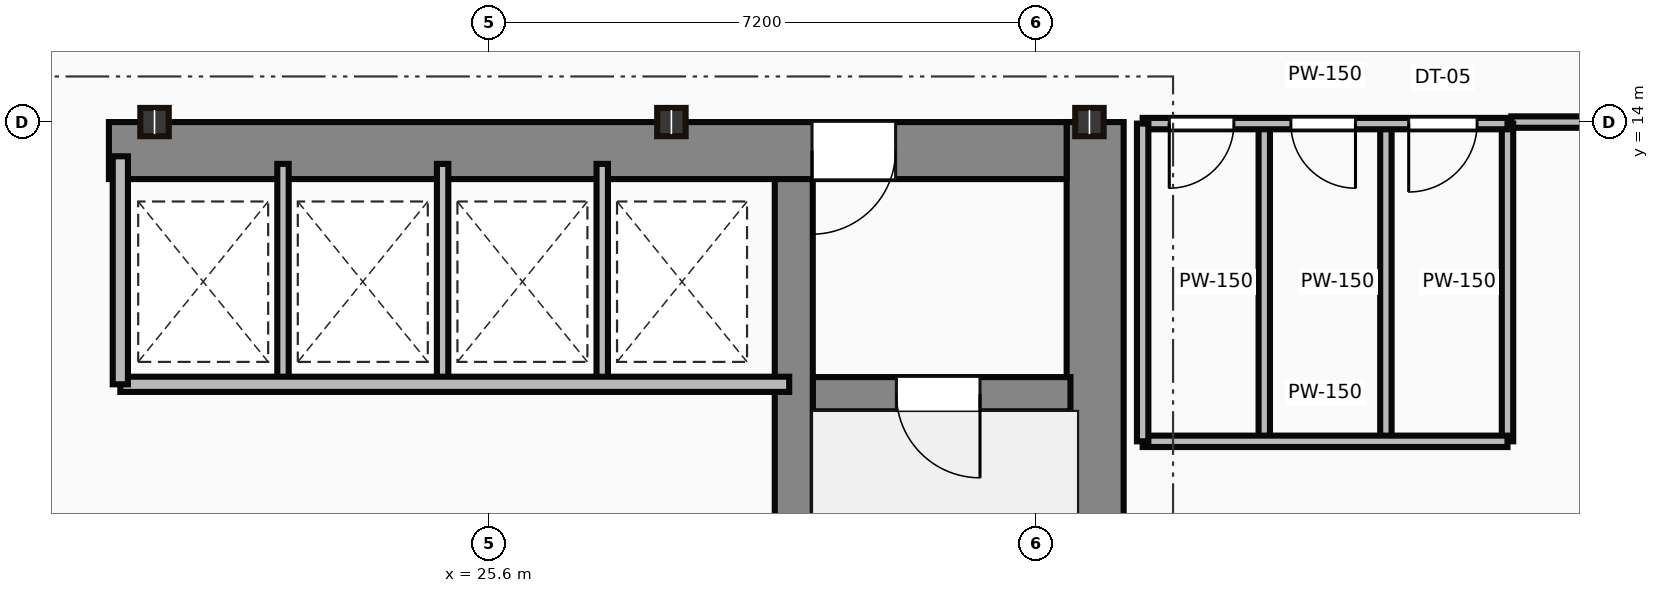
"""IFC4 building model, lengths in metres.
Left out: names, types, materials, properties, quantities, classifications, styles, units other than length and angle.
Written with IfcOpenShell. Run it as: python <this file> out.ifc"""

import sys

from ifc_helpers import new_model, si_unit, direction, frame, frame_2d, origin, origin_2d, place, context, subcontext, project, spatial, rectangle, i_section, extrude, source, transform, mapped, element, fill, save


model = new_model("IFC4")
c1 = context("Model", 3, precision=1e-05, world=origin(), true_north=direction((0.0, 1.0)))
c2 = subcontext(c1, "Body", "Model", "MODEL_VIEW")
j1 = project(units=[si_unit("LENGTHUNIT", "METRE"), si_unit("PLANEANGLEUNIT", "RADIAN")], contexts=[c1])
p1 = place(None, origin())
s1 = spatial("IfcSite", under=j1, at=p1, CompositionType="ELEMENT")
p2 = place(p1, origin())
s2 = spatial("IfcBuilding", under=s1, at=p2, CompositionType="ELEMENT")
p3 = place(p2, frame((0.0, 0.0, 162.5)))
s3 = spatial("IfcBuildingStorey", under=s2, at=p3, CompositionType="ELEMENT", Elevation=162.5)
m1 = source(origin(), c2, "Body", "SweptSolid", [
    extrude(rectangle(XDim=13.1, YDim=0.75, at=frame_2d((6.55, 0.0))), origin(), (0.0, 0.0, 1.0), 3.65),
])
p4 = place(p3, frame((33.575, 0.9, 0.0), z_axis=(0.0, 0.0, 1.0), x_axis=(0.0, 1.0, 0.0)))
e1 = element("IfcWall", 1, at=p4, inside=s3, PredefinedType="SHEAR", context=c2, shape_type="MappedRepresentation", body=[
    mapped(m1, transform((0.0, 0.0, 0.0))),
])
m2 = source(origin(), c2, "Body", "SweptSolid", [
    extrude(rectangle(XDim=12.6, YDim=0.75, at=frame_2d((6.3, 0.0))), origin(), (0.0, 0.0, 1.0), 3.65),
])
p5 = place(p3, frame((20.6, 13.625, 0.0), z_axis=(0.0, 0.0, 1.0), x_axis=(1.0, 0.0, 0.0)))
e2 = element("IfcWall", 2, at=p5, inside=s3, PredefinedType="SHEAR", context=c2, shape_type="MappedRepresentation", body=[
    mapped(m2, transform((0.0, 0.0, 0.0))),
])
p6 = place(p5, frame((9.25, 0.0, 0.0)))
e3 = element("IfcOpeningElement", 3, at=p6, cuts=e2, PredefinedType="OPENING", context=c2, shape_type="SweptSolid", body=[
    extrude(rectangle(XDim=1.1, YDim=2.15, at=frame_2d((0.55, 1.075))), frame((0.0, 0.385, 0.0), z_axis=(0.0, -1.0, 0.0), x_axis=(1.0, 0.0, 0.0)), (0.0, 0.0, 1.0), 0.77),
])
m3 = source(origin(), c2, "Body", "SweptSolid", [
    extrude(rectangle(XDim=12.35, YDim=0.5, at=frame_2d((6.175, 0.0))), origin(), (0.0, 0.0, 1.0), 3.65),
])
p7 = place(p3, frame((29.61, 0.9, 0.0), z_axis=(0.0, 0.0, 1.0), x_axis=(0.0, 1.0, 0.0)))
e4 = element("IfcWall", 4, at=p7, inside=s3, PredefinedType="SHEAR", context=c2, shape_type="MappedRepresentation", body=[
    mapped(m3, transform((0.0, 0.0, 0.0))),
])
m4 = source(origin(), c2, "Body", "SweptSolid", [
    extrude(rectangle(XDim=3.39, YDim=0.45, at=frame_2d((1.695, 0.0))), origin(), (0.0, 0.0, 1.0), 3.65),
])
p8 = place(p3, frame((29.86, 10.42, 0.0), z_axis=(0.0, 0.0, 1.0), x_axis=(1.0, 0.0, 0.0)))
e5 = element("IfcWall", 5, at=p8, inside=s3, PredefinedType="SHEAR", context=c2, shape_type="MappedRepresentation", body=[
    mapped(m4, transform((0.0, 0.0, 0.0))),
])
p9 = place(p8, frame((1.1, 0.0, 0.0)))
e6 = element("IfcOpeningElement", 6, at=p9, cuts=e5, PredefinedType="OPENING", context=c2, shape_type="SweptSolid", body=[
    extrude(rectangle(XDim=1.1, YDim=2.15, at=frame_2d((0.55, 1.075))), frame((0.0, 0.235, 0.0), z_axis=(0.0, -1.0, 0.0), x_axis=(1.0, 0.0, 0.0)), (0.0, 0.0, 1.0), 0.47),
])
m5 = source(origin(), c2, "Body", "SweptSolid", [
    extrude(i_section(OverallWidth=0.374, OverallDepth=0.372, WebThickness=0.016, FlangeThickness=0.026, at=origin_2d()), origin(), (0.0, 0.0, 1.0), 3.65),
])
for number, where, z_axis, x_axis in (
    (7, (21.2, 14.0, 0.0), (0.0, 0.0, 1.0), (1.0, 0.0, 0.0)),
    (8, (28.0, 14.0, 0.0), (0.0, 0.0, 1.0), (1.0, 0.0, 0.0)),
    (9, (33.5, 14.0, 0.0), (0.0, 0.0, 1.0), (1.0, 0.0, 0.0)),
):
    element("IfcColumn", number, at=place(p3, frame(where, z_axis=z_axis, x_axis=x_axis)), inside=s3, PredefinedType="COLUMN", context=c2, shape_type="MappedRepresentation", body=[
        mapped(m5, transform((0.0, 0.0, 0.0))),
    ])
m6 = source(origin(), c2, "Body", "SweptSolid", [
    extrude(rectangle(XDim=8.8, YDim=0.2, at=frame_2d((4.4, 0.0))), origin(), (0.0, 0.0, 1.0), 3.4),
])
p10 = place(p3, frame((20.75, 10.55, 0.0), z_axis=(0.0, 0.0, 1.0), x_axis=(1.0, 0.0, 0.0)))
e10 = element("IfcWall", 10, at=p10, inside=s3, PredefinedType="PARTITIONING", context=c2, shape_type="MappedRepresentation", body=[
    mapped(m6, transform((0.0, 0.0, 0.0))),
])
m7 = source(origin(), c2, "Body", "SweptSolid", [
    extrude(rectangle(XDim=3.0, YDim=0.2, at=frame_2d((1.5, 0.0))), origin(), (0.0, 0.0, 1.0), 3.4),
])
p11 = place(p3, frame((20.75, 10.55, 0.0), z_axis=(0.0, 0.0, 1.0), x_axis=(0.0, 1.0, 0.0)))
e11 = element("IfcWall", 11, at=p11, inside=s3, PredefinedType="PARTITIONING", context=c2, shape_type="MappedRepresentation", body=[
    mapped(m7, transform((0.0, 0.0, 0.0))),
])
m8 = source(origin(), c2, "Body", "SweptSolid", [
    extrude(rectangle(XDim=2.85, YDim=0.15, at=frame_2d((1.425, 0.0))), origin(), (0.0, 0.0, 1.0), 3.4),
])
for number, where, z_axis, x_axis in (
    (12, (22.89, 10.6, 0.0), (0.0, 0.0, 1.0), (0.0, 1.0, 0.0)),
    (13, (24.99, 10.6, 0.0), (0.0, 0.0, 1.0), (0.0, 1.0, 0.0)),
    (14, (27.09, 10.6, 0.0), (0.0, 0.0, 1.0), (0.0, 1.0, 0.0)),
):
    element("IfcWall", number, at=place(p3, frame(where, z_axis=z_axis, x_axis=x_axis)), inside=s3, PredefinedType="PARTITIONING", context=c2, shape_type="MappedRepresentation", body=[
        mapped(m8, transform((0.0, 0.0, 0.0))),
    ])
m9 = source(origin(), c2, "Body", "SweptSolid", [
    extrude(rectangle(XDim=4.8, YDim=0.15, at=frame_2d((2.4, 0.0))), origin(), (0.0, 0.0, 1.0), 2.76),
])
p12 = place(p3, frame((34.2, 13.98, 0.0), z_axis=(0.0, 0.0, 1.0), x_axis=(1.0, 0.0, 0.0)))
e15 = element("IfcWall", 15, at=p12, inside=s3, PredefinedType="PARTITIONING", context=c2, shape_type="MappedRepresentation", body=[
    mapped(m9, transform((0.0, 0.0, 0.0))),
])
p13 = place(p12, frame((0.35, 0.0, 0.0)))
e16 = element("IfcOpeningElement", 16, at=p13, cuts=e15, PredefinedType="OPENING", context=c2, shape_type="SweptSolid", body=[
    extrude(rectangle(XDim=0.85, YDim=2.1, at=frame_2d((0.425, 1.05))), frame((0.0, 0.085, 0.0), z_axis=(0.0, -1.0, 0.0), x_axis=(1.0, 0.0, 0.0)), (0.0, 0.0, 1.0), 0.17),
])
p14 = place(p12, frame((1.95, 0.0, 0.0)))
e17 = element("IfcOpeningElement", 17, at=p14, cuts=e15, PredefinedType="OPENING", context=c2, shape_type="SweptSolid", body=[
    extrude(rectangle(XDim=0.85, YDim=2.1, at=frame_2d((0.425, 1.05))), frame((0.0, 0.085, 0.0), z_axis=(0.0, -1.0, 0.0), x_axis=(1.0, 0.0, 0.0)), (0.0, 0.0, 1.0), 0.17),
])
p15 = place(p12, frame((3.5, 0.0, 0.0)))
e18 = element("IfcOpeningElement", 18, at=p15, cuts=e15, PredefinedType="OPENING", context=c2, shape_type="SweptSolid", body=[
    extrude(rectangle(XDim=0.9, YDim=2.1, at=frame_2d((0.45, 1.05))), frame((0.0, 0.085, 0.0), z_axis=(0.0, -1.0, 0.0), x_axis=(1.0, 0.0, 0.0)), (0.0, 0.0, 1.0), 0.17),
])
m10 = source(origin(), c2, "Body", "SweptSolid", [
    extrude(rectangle(XDim=4.8, YDim=0.15, at=frame_2d((2.4, 0.0))), origin(), (0.0, 0.0, 1.0), 3.4),
])
p16 = place(p3, frame((34.2, 9.8, 0.0), z_axis=(0.0, 0.0, 1.0), x_axis=(1.0, 0.0, 0.0)))
e19 = element("IfcWall", 19, at=p16, inside=s3, PredefinedType="PARTITIONING", context=c2, shape_type="MappedRepresentation", body=[
    mapped(m10, transform((0.0, 0.0, 0.0))),
])
m11 = source(origin(), c2, "Body", "SweptSolid", [
    extrude(rectangle(XDim=4.18, YDim=0.15, at=frame_2d((2.09, 0.0))), origin(), (0.0, 0.0, 1.0), 3.4),
])
for number, where, z_axis, x_axis in (
    (20, (39.0, 9.8, 0.0), (0.0, 0.0, 1.0), (0.0, 1.0, 0.0)),
    (21, (34.2, 9.8, 0.0), (0.0, 0.0, 1.0), (0.0, 1.0, 0.0)),
    (22, (35.8, 9.8, 0.0), (0.0, 0.0, 1.0), (0.0, 1.0, 0.0)),
    (23, (37.4, 9.8, 0.0), (0.0, 0.0, 1.0), (0.0, 1.0, 0.0)),
):
    element("IfcWall", number, at=place(p3, frame(where, z_axis=z_axis, x_axis=x_axis)), inside=s3, PredefinedType="PARTITIONING", context=c2, shape_type="MappedRepresentation", body=[
        mapped(m11, transform((0.0, 0.0, 0.0))),
    ])
m12 = source(origin(), c2, "Body", "SweptSolid", [
    extrude(rectangle(XDim=1.75, YDim=0.15, at=frame_2d((0.875, 0.0))), origin(), (0.0, 0.0, 1.0), 2.76),
])
p17 = place(p3, frame((40.8, 14.0, 0.0), z_axis=(0.0, 0.0, 1.0), x_axis=(-1.0, 0.0, 0.0)))
e24 = element("IfcWall", 24, at=p17, inside=s3, PredefinedType="PARTITIONING", context=c2, shape_type="MappedRepresentation", body=[
    mapped(m12, transform((0.0, 0.0, 0.0))),
])
m13 = source(origin(), c2, "Body", "SweptSolid", [
    extrude(rectangle(XDim=1.1, YDim=2.15, at=frame_2d((0.55, 1.075))), frame((0.0, 0.025, 0.0), z_axis=(0.0, -1.0, 0.0), x_axis=(1.0, 0.0, 0.0)), (0.0, 0.0, 1.0), 0.05),
])
p18 = place(p9, frame((1.1, 0.0, 0.0), z_axis=(0.0, 0.0, 1.0), x_axis=(-1.0, 0.0, 0.0)))
e25 = element("IfcDoor", 25, at=p18, inside=s3, OperationType="SINGLE_SWING_RIGHT", PredefinedType="DOOR", context=c2, shape_type="MappedRepresentation", body=[
    mapped(m13, transform((0.0, 0.0, 0.0))),
])
fill(e6, e25)
p19 = place(p6, origin())
e26 = element("IfcDoor", 26, at=p19, inside=s3, OperationType="SINGLE_SWING_LEFT", PredefinedType="DOOR", context=c2, shape_type="MappedRepresentation", body=[
    mapped(m13, transform((0.0, 0.0, 0.0))),
])
fill(e3, e26)
m14 = source(origin(), c2, "Body", "SweptSolid", [
    extrude(rectangle(XDim=0.85, YDim=2.1, at=frame_2d((0.425, 1.05))), frame((0.0, 0.025, 0.0), z_axis=(0.0, -1.0, 0.0), x_axis=(1.0, 0.0, 0.0)), (0.0, 0.0, 1.0), 0.05),
])
p20 = place(p13, frame((0.85, 0.0, 0.0), z_axis=(0.0, 0.0, 1.0), x_axis=(-1.0, 0.0, 0.0)))
e27 = element("IfcDoor", 27, at=p20, inside=s3, OperationType="SINGLE_SWING_LEFT", PredefinedType="DOOR", context=c2, shape_type="MappedRepresentation", body=[
    mapped(m14, transform((0.0, 0.0, 0.0))),
])
fill(e16, e27)
p21 = place(p14, frame((0.85, 0.0, 0.0), z_axis=(0.0, 0.0, 1.0), x_axis=(-1.0, 0.0, 0.0)))
e28 = element("IfcDoor", 28, at=p21, inside=s3, OperationType="SINGLE_SWING_RIGHT", PredefinedType="DOOR", context=c2, shape_type="MappedRepresentation", body=[
    mapped(m14, transform((0.0, 0.0, 0.0))),
])
fill(e17, e28)
m15 = source(origin(), c2, "Body", "SweptSolid", [
    extrude(rectangle(XDim=0.9, YDim=2.1, at=frame_2d((0.45, 1.05))), frame((0.0, 0.025, 0.0), z_axis=(0.0, -1.0, 0.0), x_axis=(1.0, 0.0, 0.0)), (0.0, 0.0, 1.0), 0.05),
])
p22 = place(p15, frame((0.9, 0.0, 0.0), z_axis=(0.0, 0.0, 1.0), x_axis=(-1.0, 0.0, 0.0)))
e29 = element("IfcDoor", 29, at=p22, inside=s3, OperationType="SINGLE_SWING_LEFT", PredefinedType="DOOR", context=c2, shape_type="MappedRepresentation", body=[
    mapped(m15, transform((0.0, 0.0, 0.0))),
])
fill(e18, e29)
save(model, sys.argv[1])
